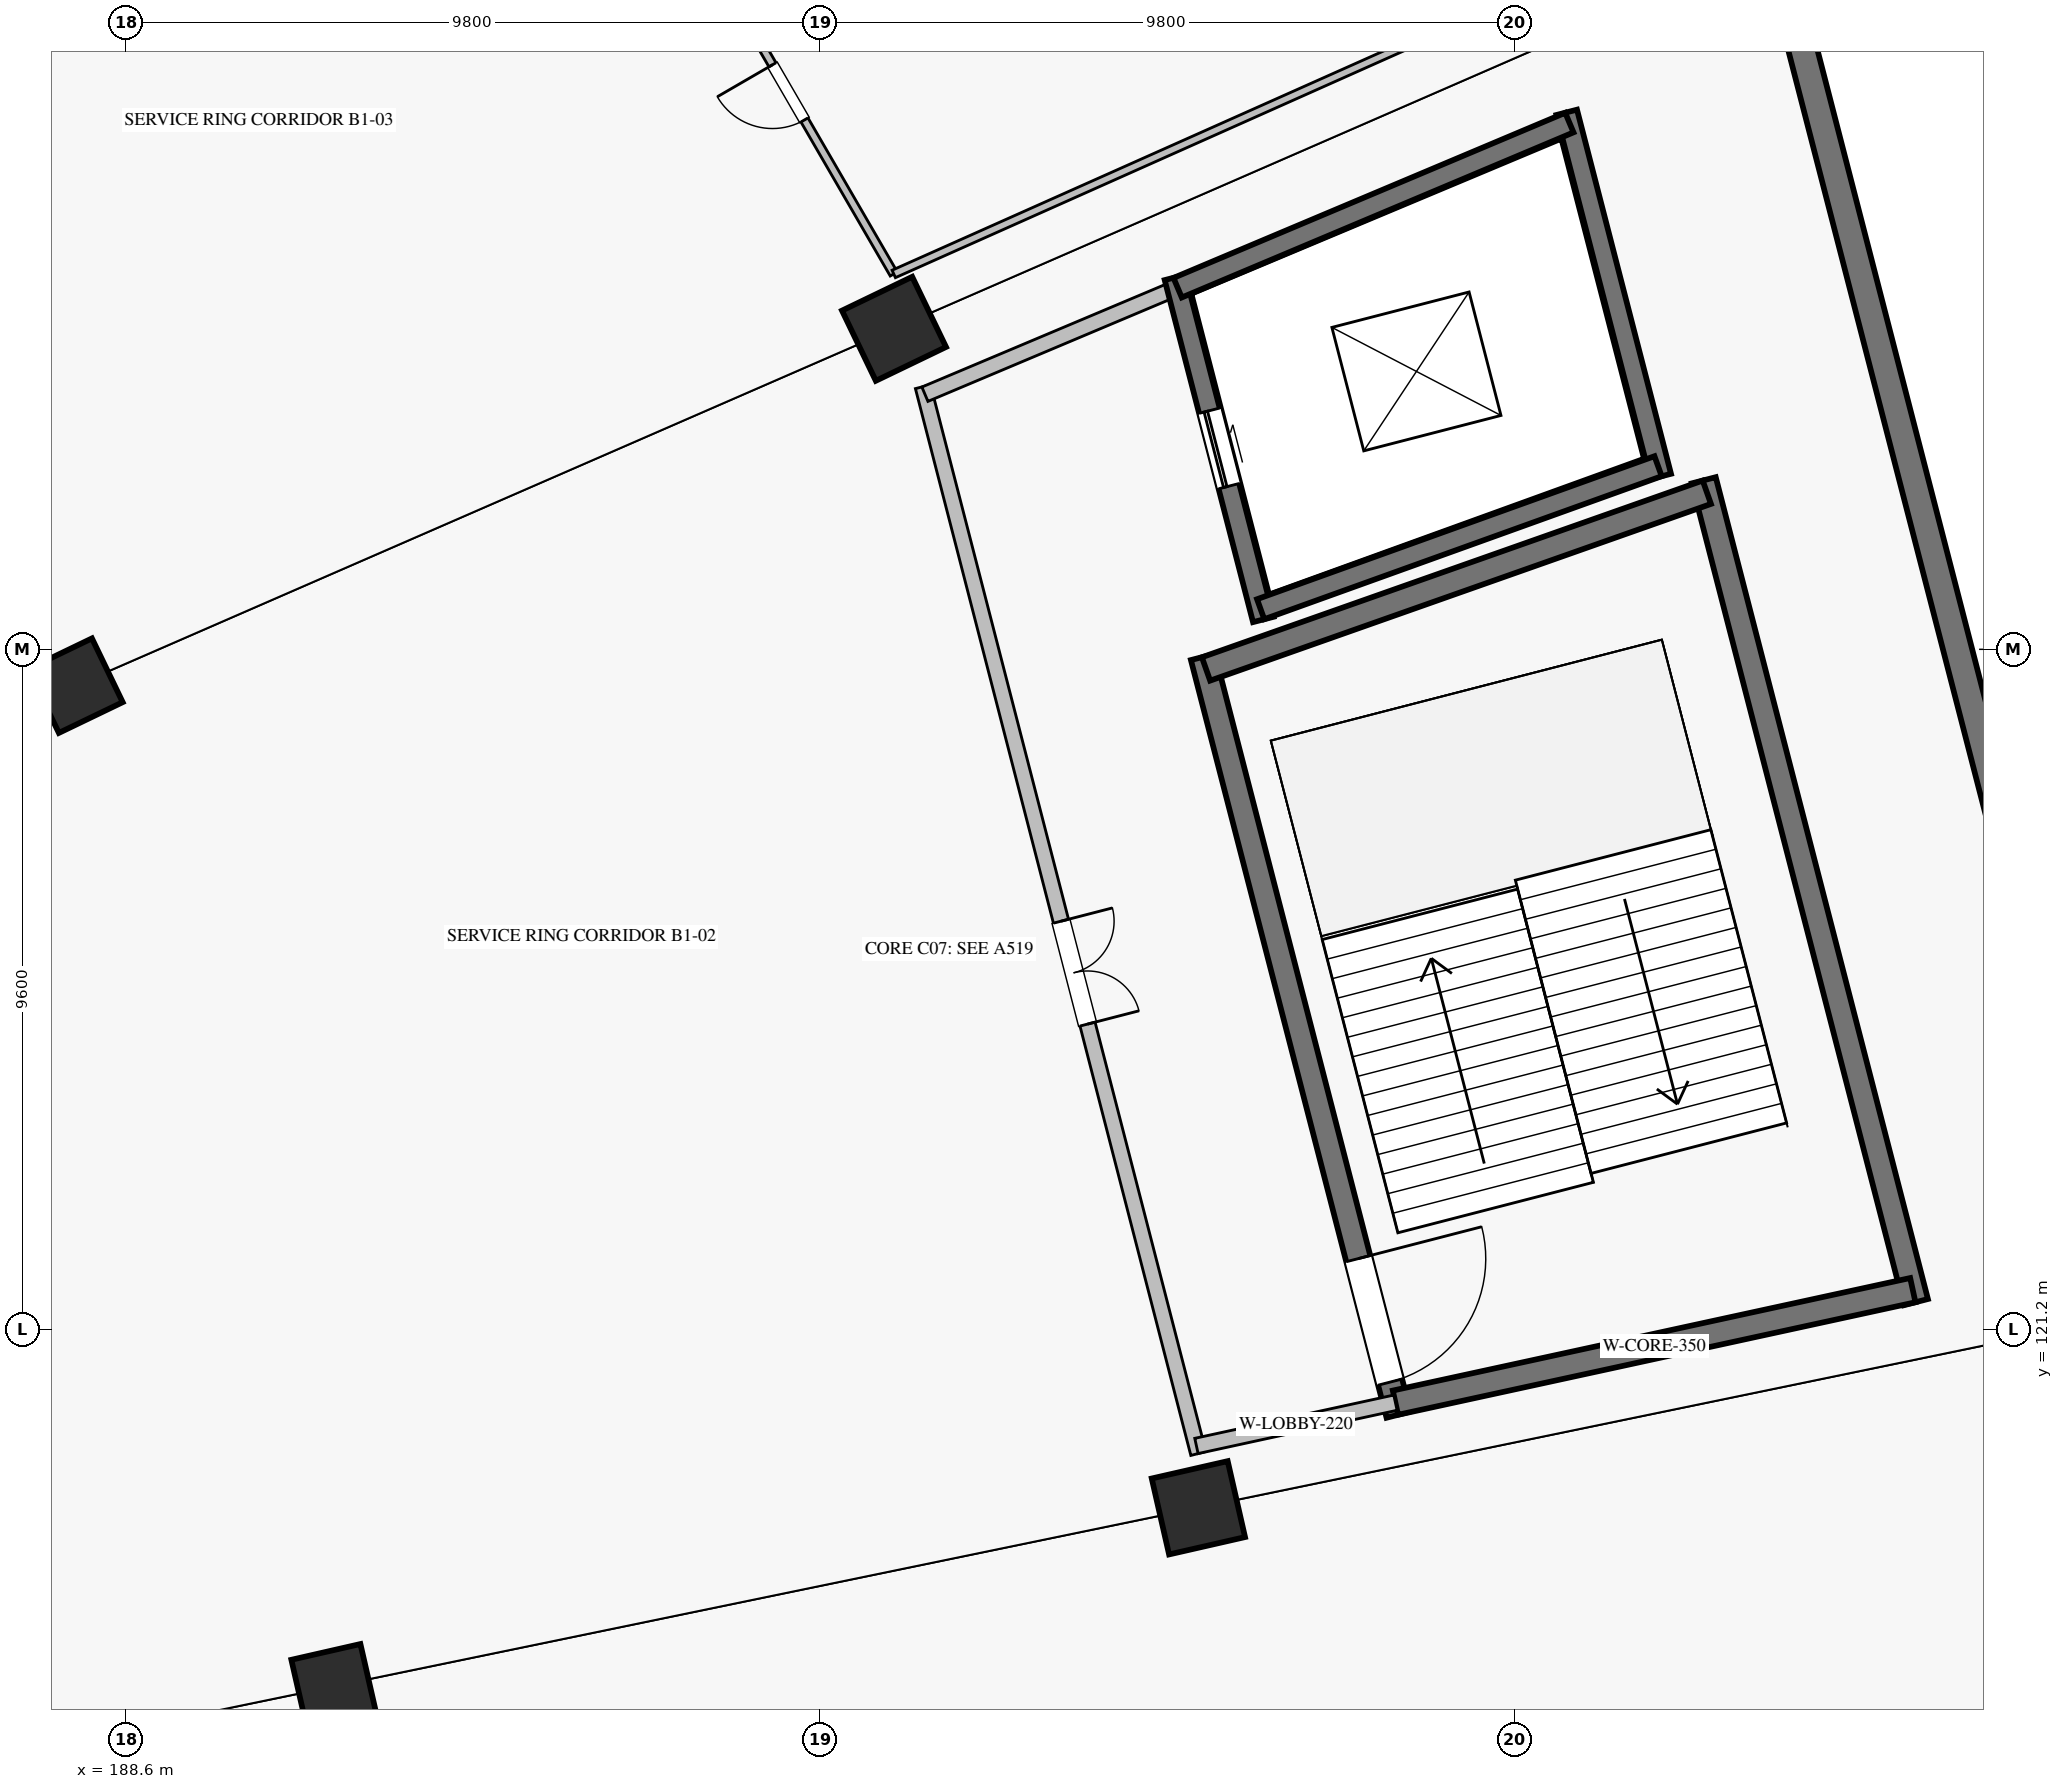
"""IFC4 building model, lengths in metres.
Left out: names, types, materials, properties, quantities, classifications, styles, units other than length and angle.
Written with IfcOpenShell. Run it as: python <this file> out.ifc"""

import sys

from ifc_helpers import new_model, si_unit, direction, frame, frame_2d, origin, origin_2d, place, context, subcontext, project, spatial, rectangle, extrude, element, fill, save


model = new_model("IFC4")
c1 = context("Model", 3, precision=1e-05, world=origin(), true_north=direction((0.0, 1.0)))
c2 = subcontext(c1, "Body", "Model", "MODEL_VIEW")
j1 = project(units=[si_unit("LENGTHUNIT", "METRE"), si_unit("PLANEANGLEUNIT", "RADIAN")], contexts=[c1])
p1 = place(None, origin())
s1 = spatial("IfcSite", under=j1, at=p1, CompositionType="ELEMENT")
p2 = place(p1, origin())
s2 = spatial("IfcBuilding", under=s1, at=p2, CompositionType="ELEMENT")
p3 = place(p2, frame((0.0, 0.0, -5.44)))
s3 = spatial("IfcBuildingStorey", under=s2, at=p3, CompositionType="ELEMENT", Elevation=-5.44)
for number, where, z_axis, x_axis in (
    (1, (191.533, 116.16, 0.0), (0.0, 0.0, 1.0), (0.975, 0.223, 0.0)),
    (2, (187.886, 130.287, 0.0), (0.0, 0.0, 1.0), (0.901, 0.434, 0.0)),
):
    element("IfcColumn", number, at=place(p3, frame(where, z_axis=z_axis, x_axis=x_axis)), inside=s3, PredefinedType="COLUMN", context=c2, shape_type="SweptSolid", body=[
        extrude(rectangle(XDim=1.0, YDim=1.0, at=origin_2d()), origin(), (0.0, 0.0, 1.0), 5.44),
    ])
for number, where, z_axis, x_axis in (
    (3, (203.738, 118.682, 0.0), (0.0, 0.0, 1.0), (0.975, 0.223, 0.0)),
    (4, (199.441, 135.325, 0.0), (0.0, 0.0, 1.0), (0.901, 0.434, 0.0)),
):
    element("IfcColumn", number, at=place(p3, frame(where, z_axis=z_axis, x_axis=x_axis)), inside=s3, PredefinedType="COLUMN", context=c2, shape_type="SweptSolid", body=[
        extrude(rectangle(XDim=1.1, YDim=1.1, at=origin_2d()), origin(), (0.0, 0.0, 1.0), 5.44),
    ])
p4 = place(p3, frame((216.783, 121.775, 0.0), z_axis=(0.0, 0.0, 1.0), x_axis=(-0.249961059007, 0.968255890238, 0.0)))
e5 = element("IfcWall", 5, at=p4, inside=s3, PredefinedType="SOLIDWALL", context=c2, shape_type="SweptSolid", body=[
    extrude(rectangle(XDim=19.206, YDim=0.4, at=frame_2d((9.603, 0.0))), origin(), (0.0, 0.0, 1.0), 4.42),
])
p5 = place(p3, frame((206.562, 119.996, 0.0), z_axis=(0.0, 0.0, 1.0), x_axis=(-0.249959564539, 0.968256276042, 0.0)))
e6 = element("IfcWall", 6, at=p5, inside=s3, PredefinedType="SHEAR", context=c2, shape_type="SweptSolid", body=[
    extrude(rectangle(XDim=11.047, YDim=0.35, at=frame_2d((5.523, 0.0))), origin(), (0.0, 0.0, 1.0), 5.14),
])
p6 = place(p5, frame((0.475, 0.0, 0.0)))
e7 = element("IfcOpeningElement", 7, at=p6, cuts=e6, PredefinedType="OPENING", context=c2, shape_type="SweptSolid", body=[
    extrude(rectangle(XDim=1.8, YDim=2.2, at=frame_2d((0.9, 1.1))), frame((0.0, 0.185, 0.0), z_axis=(0.0, -1.0, 0.0), x_axis=(1.0, 0.0, 0.0)), (0.0, 0.0, 1.0), 0.37),
])
p7 = place(p3, frame((213.866, 121.585, 0.0), z_axis=(0.0, 0.0, 1.0), x_axis=(-0.249969221583, 0.968253782983, 0.0)))
e8 = element("IfcWall", 8, at=p7, inside=s3, PredefinedType="SHEAR", context=c2, shape_type="SweptSolid", body=[
    extrude(rectangle(XDim=11.982, YDim=0.35, at=frame_2d((5.991, 0.0))), origin(), (0.0, 0.0, 1.0), 5.14),
])
p8 = place(p3, frame((206.519, 120.166, 0.0), z_axis=(0.0, 0.0, 1.0), x_axis=(0.977149528138, 0.2125530514, 0.0)))
e9 = element("IfcWall", 9, at=p8, inside=s3, PredefinedType="SHEAR", context=c2, shape_type="SweptSolid", body=[
    extrude(rectangle(XDim=7.474, YDim=0.35, at=frame_2d((3.737, 0.0))), origin(), (0.0, 0.0, 1.0), 5.14),
])
p9 = place(p3, frame((203.845, 130.523, 0.0), z_axis=(0.0, 0.0, 1.0), x_axis=(0.943032412173, 0.332700871042, 0.0)))
e10 = element("IfcWall", 10, at=p9, inside=s3, PredefinedType="SHEAR", context=c2, shape_type="SweptSolid", body=[
    extrude(rectangle(XDim=7.497, YDim=0.35, at=frame_2d((3.748, 0.0))), origin(), (0.0, 0.0, 1.0), 5.14),
])
p10 = place(p3, frame((204.654, 131.221, 0.0), z_axis=(0.0, 0.0, 1.0), x_axis=(-0.250003862389, 0.968244839279, 0.0)))
e11 = element("IfcWall", 11, at=p10, inside=s3, PredefinedType="SHEAR", context=c2, shape_type="SweptSolid", body=[
    extrude(rectangle(XDim=4.987, YDim=0.3, at=frame_2d((2.494, 0.0))), origin(), (0.0, 0.0, 1.0), 5.14),
])
p11 = place(p10, frame((1.944, 0.0, 0.0)))
e12 = element("IfcOpeningElement", 12, at=p11, cuts=e11, PredefinedType="OPENING", context=c2, shape_type="SweptSolid", body=[
    extrude(rectangle(XDim=1.1, YDim=2.2, at=frame_2d((0.55, 1.1))), frame((0.0, 0.16, 0.0), z_axis=(0.0, -1.0, 0.0), x_axis=(1.0, 0.0, 0.0)), (0.0, 0.0, 1.0), 0.32),
])
p12 = place(p3, frame((210.264, 133.24, 0.0), z_axis=(0.0, 0.0, 1.0), x_axis=(-0.249961459705, 0.968255786795, 0.0)))
e13 = element("IfcWall", 13, at=p12, inside=s3, PredefinedType="SHEAR", context=c2, shape_type="SweptSolid", body=[
    extrude(rectangle(XDim=5.309, YDim=0.3, at=frame_2d((2.655, 0.0))), origin(), (0.0, 0.0, 1.0), 5.14),
])
p13 = place(p3, frame((204.616, 131.366, 0.0), z_axis=(0.0, 0.0, 1.0), x_axis=(0.940945340179, 0.338558513103, 0.0)))
e14 = element("IfcWall", 14, at=p13, inside=s3, PredefinedType="SHEAR", context=c2, shape_type="SweptSolid", body=[
    extrude(rectangle(XDim=5.962, YDim=0.3, at=frame_2d((2.981, 0.0))), origin(), (0.0, 0.0, 1.0), 5.14),
])
p14 = place(p3, frame((203.445, 135.905, 0.0), z_axis=(0.0, 0.0, 1.0), x_axis=(0.92149593043, 0.388388015007, 0.0)))
e15 = element("IfcWall", 15, at=p14, inside=s3, PredefinedType="SHEAR", context=c2, shape_type="SweptSolid", body=[
    extrude(rectangle(XDim=6.001, YDim=0.3, at=frame_2d((3.0, 0.0))), origin(), (0.0, 0.0, 1.0), 5.14),
])
p15 = place(p3, frame((203.737, 119.448, 0.0), z_axis=(0.0, 0.0, 1.0), x_axis=(-0.249963472505, 0.968255267176, 0.0)))
e16 = element("IfcWall", 16, at=p15, inside=s3, PredefinedType="SOLIDWALL", context=c2, shape_type="SweptSolid", body=[
    extrude(rectangle(XDim=15.553, YDim=0.22, at=frame_2d((7.776, 0.0))), origin(), (0.0, 0.0, 1.0), 4.088),
])
p16 = place(p15, frame((6.26, 0.0, 0.0)))
e17 = element("IfcOpeningElement", 17, at=p16, cuts=e16, PredefinedType="OPENING", context=c2, shape_type="SweptSolid", body=[
    extrude(rectangle(XDim=1.5, YDim=2.2, at=frame_2d((0.75, 1.1))), frame((0.0, 0.12, 0.0), z_axis=(0.0, -1.0, 0.0), x_axis=(1.0, 0.0, 0.0)), (0.0, 0.0, 1.0), 0.24),
])
p17 = place(p3, frame((203.71, 119.555, 0.0), z_axis=(0.0, 0.0, 1.0), x_axis=(0.977160263607, 0.212503692268, 0.0)))
e18 = element("IfcWall", 18, at=p17, inside=s3, PredefinedType="SOLIDWALL", context=c2, shape_type="SweptSolid", body=[
    extrude(rectangle(XDim=2.875, YDim=0.22, at=frame_2d((1.437, 0.0))), origin(), (0.0, 0.0, 1.0), 5.14),
])
p18 = place(p3, frame((199.877, 134.401, 0.0), z_axis=(0.0, 0.0, 1.0), x_axis=(0.921486922561, 0.388409386535, 0.0)))
e19 = element("IfcWall", 19, at=p18, inside=s3, PredefinedType="SOLIDWALL", context=c2, shape_type="SweptSolid", body=[
    extrude(rectangle(XDim=3.871, YDim=0.22, at=frame_2d((1.936, 0.0))), origin(), (0.0, 0.0, 1.0), 5.14),
])
p19 = place(p3, frame((199.438, 136.099, 0.0), z_axis=(0.0, 0.0, 1.0), x_axis=(-0.501617777052, 0.865089362867, 0.0)))
e20 = element("IfcWall", 20, at=p19, inside=s3, PredefinedType="PARTITIONING", context=c2, shape_type="SweptSolid", body=[
    extrude(rectangle(XDim=16.464, YDim=0.115, at=frame_2d((8.232, 0.0))), origin(), (0.0, 0.0, 1.0), 4.46),
])
p20 = place(p19, frame((2.513, 0.0, 0.0)))
e21 = element("IfcOpeningElement", 21, at=p20, cuts=e20, PredefinedType="OPENING", context=c2, shape_type="SweptSolid", body=[
    extrude(rectangle(XDim=0.9, YDim=2.1, at=frame_2d((0.45, 1.05))), frame((0.0, 0.067, 0.0), z_axis=(0.0, -1.0, 0.0), x_axis=(1.0, 0.0, 0.0)), (0.0, 0.0, 1.0), 0.135),
])
p21 = place(p19, frame((8.44, 0.0, 0.0)))
e22 = element("IfcOpeningElement", 22, at=p21, cuts=e20, PredefinedType="OPENING", context=c2, shape_type="SweptSolid", body=[
    extrude(rectangle(XDim=0.9, YDim=2.1, at=frame_2d((0.45, 1.05))), frame((0.0, 0.067, 0.0), z_axis=(0.0, -1.0, 0.0), x_axis=(1.0, 0.0, 0.0)), (0.0, 0.0, 1.0), 0.135),
])
p22 = place(p19, frame((13.634, 0.0, 0.0)))
e23 = element("IfcOpeningElement", 23, at=p22, cuts=e20, PredefinedType="OPENING", context=c2, shape_type="SweptSolid", body=[
    extrude(rectangle(XDim=1.05, YDim=2.1, at=frame_2d((0.525, 1.05))), frame((0.0, 0.067, 0.0), z_axis=(0.0, -1.0, 0.0), x_axis=(1.0, 0.0, 0.0)), (0.0, 0.0, 1.0), 0.135),
])
p23 = place(p3, frame((199.438, 136.099, 0.0), z_axis=(0.0, 0.0, 1.0), x_axis=(0.913245562849, 0.407409550621, 0.0)))
e24 = element("IfcWall", 24, at=p23, inside=s3, PredefinedType="PARTITIONING", context=c2, shape_type="SweptSolid", body=[
    extrude(rectangle(XDim=12.4, YDim=0.115, at=frame_2d((6.2, 0.0))), origin(), (0.0, 0.0, 1.0), 4.46),
])
p24 = place(p6, frame((1.8, 0.0, 0.0), z_axis=(0.0, 0.0, 1.0), x_axis=(-1.0, 0.0, 0.0)))
e25 = element("IfcDoor", 25, at=p24, inside=s3, OperationType="SINGLE_SWING_LEFT", PredefinedType="DOOR", context=c2, shape_type="SweptSolid", body=[
    extrude(rectangle(XDim=1.8, YDim=2.2, at=frame_2d((0.9, 1.1))), frame((0.0, 0.025, 0.0), z_axis=(0.0, -1.0, 0.0), x_axis=(1.0, 0.0, 0.0)), (0.0, 0.0, 1.0), 0.05),
])
fill(e7, e25)
p25 = place(p11, origin())
e26 = element("IfcDoor", 26, at=p25, inside=s3, OperationType="SLIDING_TO_RIGHT", PredefinedType="DOOR", context=c2, shape_type="SweptSolid", body=[
    extrude(rectangle(XDim=1.1, YDim=2.2, at=frame_2d((0.55, 1.1))), frame((0.0, 0.025, 0.0), z_axis=(0.0, -1.0, 0.0), x_axis=(1.0, 0.0, 0.0)), (0.0, 0.0, 1.0), 0.05),
])
fill(e12, e26)
p26 = place(p16, frame((1.5, 0.0, 0.0), z_axis=(0.0, 0.0, 1.0), x_axis=(-1.0, 0.0, 0.0)))
e27 = element("IfcDoor", 27, at=p26, inside=s3, OperationType="DOUBLE_DOOR_SINGLE_SWING", PredefinedType="DOOR", context=c2, shape_type="SweptSolid", body=[
    extrude(rectangle(XDim=1.5, YDim=2.2, at=frame_2d((0.75, 1.1))), frame((0.0, 0.025, 0.0), z_axis=(0.0, -1.0, 0.0), x_axis=(1.0, 0.0, 0.0)), (0.0, 0.0, 1.0), 0.05),
])
fill(e17, e27)
p27 = place(p20, origin())
e28 = element("IfcDoor", 28, at=p27, inside=s3, OperationType="SINGLE_SWING_RIGHT", PredefinedType="DOOR", context=c2, shape_type="SweptSolid", body=[
    extrude(rectangle(XDim=0.9, YDim=2.1, at=frame_2d((0.45, 1.05))), frame((0.0, 0.025, 0.0), z_axis=(0.0, -1.0, 0.0), x_axis=(1.0, 0.0, 0.0)), (0.0, 0.0, 1.0), 0.05),
])
fill(e21, e28)
save(model, sys.argv[1])
